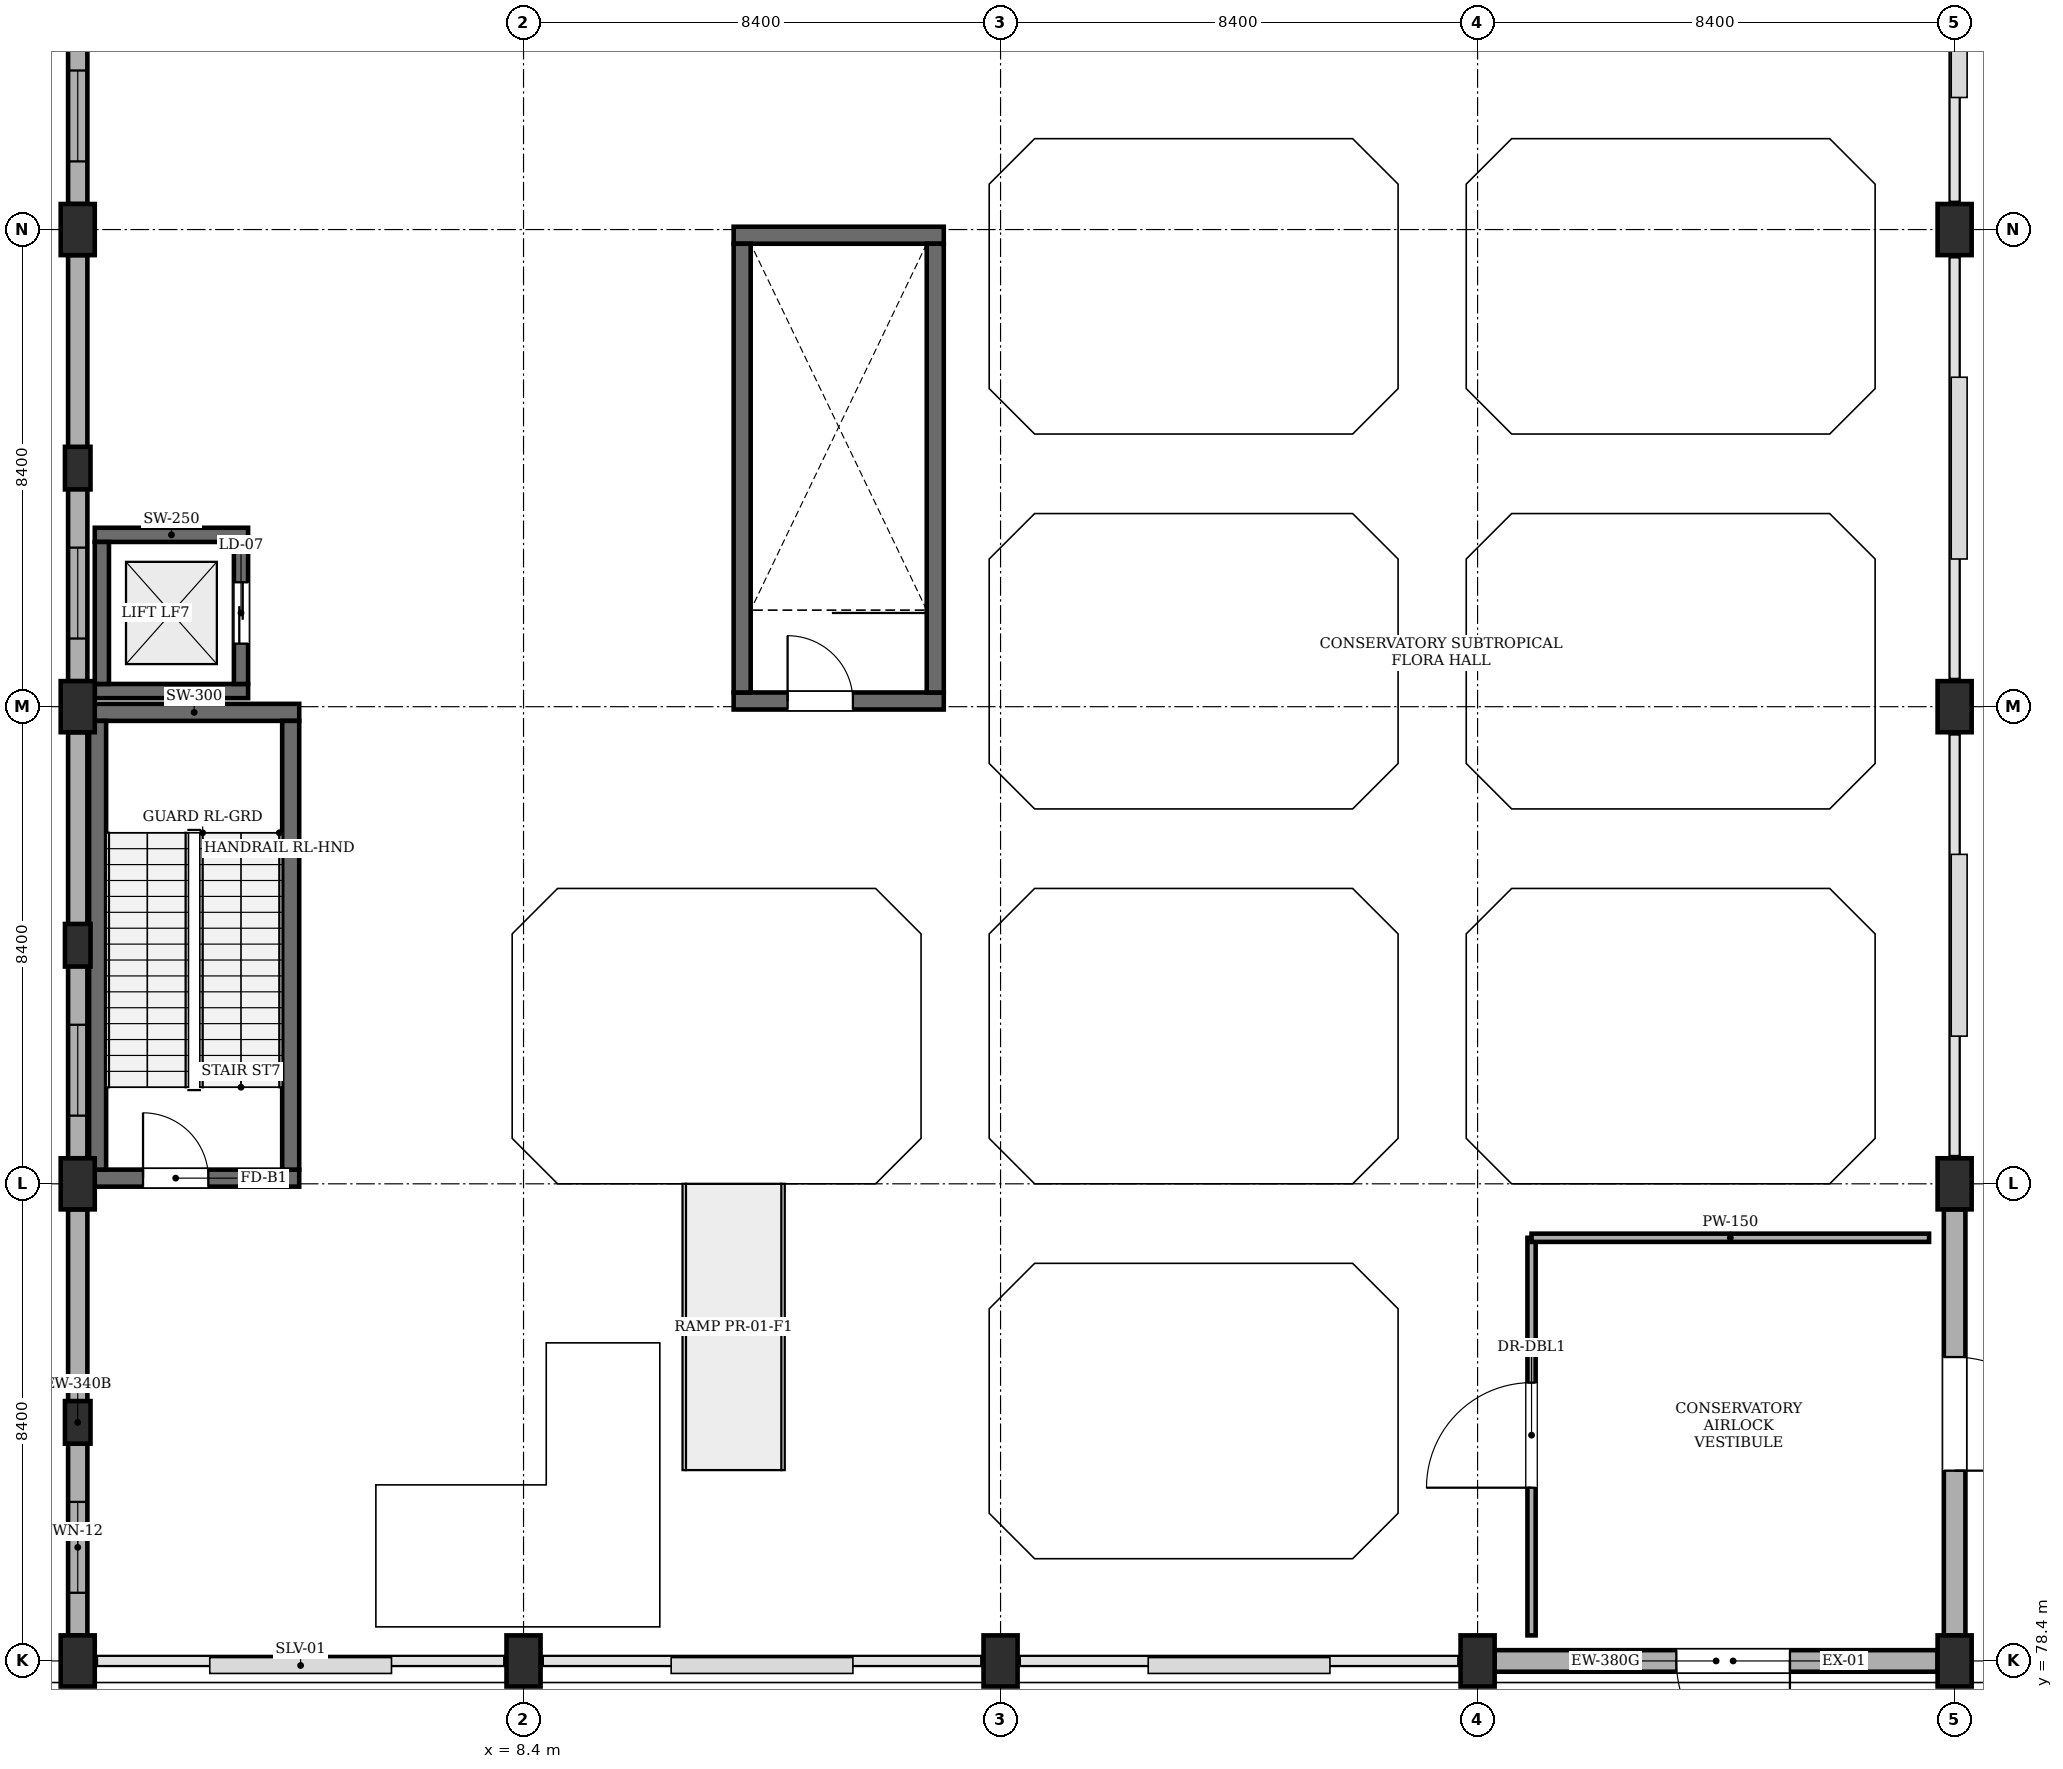
"""IFC4 building model, lengths in metres.
Left out: names, types, materials, properties, quantities, classifications, styles, units other than length and angle.
Written with IfcOpenShell. Run it as: python <this file> out.ifc"""

import sys

from ifc_helpers import new_model, si_unit, direction, frame, frame_2d, origin, origin_2d, place, context, subcontext, project, spatial, rectangle, extrude, element, fill, save


model = new_model("IFC4")
c1 = context("Model", 3, precision=1e-05, world=origin(), true_north=direction((0.0, 1.0)))
c2 = subcontext(c1, "Body", "Model", "MODEL_VIEW")
j1 = project(units=[si_unit("LENGTHUNIT", "METRE"), si_unit("PLANEANGLEUNIT", "RADIAN")], contexts=[c1])
p1 = place(None, origin())
s1 = spatial("IfcSite", under=j1, at=p1, CompositionType="ELEMENT")
p2 = place(p1, origin())
s2 = spatial("IfcBuilding", under=s1, at=p2, CompositionType="ELEMENT")
p3 = place(p2, origin())
s3 = spatial("IfcBuildingStorey", under=s2, at=p3, CompositionType="ELEMENT", Elevation=0.0)
for number, where, z_axis, x_axis in (
    (1, (0.55, 78.4, 0.0), (0.0, 0.0, 1.0), (1.0, 0.0, 0.0)),
    (2, (0.55, 86.8, 0.0), (0.0, 0.0, 1.0), (1.0, 0.0, 0.0)),
    (3, (0.55, 95.2, 0.0), (0.0, 0.0, 1.0), (1.0, 0.0, 0.0)),
    (4, (0.55, 103.6, 0.0), (0.0, 0.0, 1.0), (1.0, 0.0, 0.0)),
):
    element("IfcColumn", number, at=place(p3, frame(where, z_axis=z_axis, x_axis=x_axis)), inside=s3, PredefinedType="COLUMN", context=c2, shape_type="SweptSolid", body=[
        extrude(rectangle(XDim=0.6, YDim=0.9, at=origin_2d()), origin(), (0.0, 0.0, 1.0), 5.18),
    ])
for number, where, z_axis, x_axis in (
    (5, (8.4, 78.4, 0.0), (0.0, 0.0, 1.0), (1.0, 0.0, 0.0)),
    (6, (16.8, 78.4, 0.0), (0.0, 0.0, 1.0), (1.0, 0.0, 0.0)),
    (7, (25.2, 78.4, 0.0), (0.0, 0.0, 1.0), (1.0, 0.0, 0.0)),
    (8, (33.6, 78.4, 0.0), (0.0, 0.0, 1.0), (1.0, 0.0, 0.0)),
    (9, (33.6, 86.8, 0.0), (0.0, 0.0, 1.0), (1.0, 0.0, 0.0)),
    (10, (33.6, 95.2, 0.0), (0.0, 0.0, 1.0), (1.0, 0.0, 0.0)),
    (11, (33.6, 103.6, 0.0), (0.0, 0.0, 1.0), (1.0, 0.0, 0.0)),
):
    element("IfcColumn", number, at=place(p3, frame(where, z_axis=z_axis, x_axis=x_axis)), inside=s3, PredefinedType="COLUMN", context=c2, shape_type="SweptSolid", body=[
        extrude(rectangle(XDim=0.6, YDim=0.9, at=origin_2d()), origin(), (0.0, 0.0, 1.0), 5.4),
    ])
for number, where, z_axis, x_axis in (
    (12, (0.55, 82.6, 0.0), (0.0, 0.0, 1.0), (1.0, 0.0, 0.0)),
    (13, (0.55, 91.0, 0.0), (0.0, 0.0, 1.0), (1.0, 0.0, 0.0)),
    (14, (0.55, 99.4, 0.0), (0.0, 0.0, 1.0), (1.0, 0.0, 0.0)),
):
    element("IfcColumn", number, at=place(p3, frame(where, z_axis=z_axis, x_axis=x_axis)), inside=s3, PredefinedType="PILASTER", context=c2, shape_type="SweptSolid", body=[
        extrude(rectangle(XDim=0.45, YDim=0.75, at=origin_2d()), origin(), (0.0, 0.0, 1.0), 5.18),
    ])
p4 = place(p3, frame((0.75, 86.9, 0.0), z_axis=(0.0, 0.0, 1.0), x_axis=(1.0, 0.0, 0.0)))
e15 = element("IfcWall", 15, at=p4, inside=s3, PredefinedType="SHEAR", context=c2, shape_type="SweptSolid", body=[
    extrude(rectangle(XDim=3.7, YDim=0.3, at=frame_2d((1.85, 0.0))), origin(), (0.0, 0.0, 1.0), 5.18),
])
p5 = place(p4, frame((0.95, 0.0, 0.0)))
e16 = element("IfcOpeningElement", 16, at=p5, cuts=e15, PredefinedType="OPENING", context=c2, shape_type="SweptSolid", body=[
    extrude(rectangle(XDim=1.15, YDim=2.15, at=frame_2d((0.575, 1.075))), frame((0.0, 0.16, 0.0), z_axis=(0.0, -1.0, 0.0), x_axis=(1.0, 0.0, 0.0)), (0.0, 0.0, 1.0), 0.32),
])
p6 = place(p3, frame((0.75, 95.1, 0.0), z_axis=(0.0, 0.0, 1.0), x_axis=(1.0, 0.0, 0.0)))
e17 = element("IfcWall", 17, at=p6, inside=s3, PredefinedType="SHEAR", context=c2, shape_type="SweptSolid", body=[
    extrude(rectangle(XDim=3.7, YDim=0.3, at=frame_2d((1.85, 0.0))), origin(), (0.0, 0.0, 1.0), 5.18),
])
for number, where, z_axis, x_axis in (
    (18, (0.9, 87.05, 0.0), (0.0, 0.0, 1.0), (0.0, 1.0, 0.0)),
    (19, (4.3, 87.05, 0.0), (0.0, 0.0, 1.0), (0.0, 1.0, 0.0)),
):
    element("IfcWall", number, at=place(p3, frame(where, z_axis=z_axis, x_axis=x_axis)), inside=s3, PredefinedType="SHEAR", context=c2, shape_type="SweptSolid", body=[
        extrude(rectangle(XDim=7.9, YDim=0.3, at=frame_2d((3.95, 0.0))), origin(), (0.0, 0.0, 1.0), 5.18),
    ])
p7 = place(p3, frame((12.1, 95.3, 0.0), z_axis=(0.0, 0.0, 1.0), x_axis=(1.0, 0.0, 0.0)))
e20 = element("IfcWall", 20, at=p7, inside=s3, PredefinedType="SHEAR", context=c2, shape_type="SweptSolid", body=[
    extrude(rectangle(XDim=3.7, YDim=0.3, at=frame_2d((1.85, 0.0))), origin(), (0.0, 0.0, 1.0), 5.18),
])
p8 = place(p7, frame((0.95, 0.0, 0.0)))
e21 = element("IfcOpeningElement", 21, at=p8, cuts=e20, PredefinedType="OPENING", context=c2, shape_type="SweptSolid", body=[
    extrude(rectangle(XDim=1.15, YDim=2.15, at=frame_2d((0.575, 1.075))), frame((0.0, 0.16, 0.0), z_axis=(0.0, -1.0, 0.0), x_axis=(1.0, 0.0, 0.0)), (0.0, 0.0, 1.0), 0.32),
])
p9 = place(p3, frame((12.1, 103.5, 0.0), z_axis=(0.0, 0.0, 1.0), x_axis=(1.0, 0.0, 0.0)))
e22 = element("IfcWall", 22, at=p9, inside=s3, PredefinedType="SHEAR", context=c2, shape_type="SweptSolid", body=[
    extrude(rectangle(XDim=3.7, YDim=0.3, at=frame_2d((1.85, 0.0))), origin(), (0.0, 0.0, 1.0), 5.18),
])
for number, where, z_axis, x_axis in (
    (23, (12.25, 95.45, 0.0), (0.0, 0.0, 1.0), (0.0, 1.0, 0.0)),
    (24, (15.65, 95.45, 0.0), (0.0, 0.0, 1.0), (0.0, 1.0, 0.0)),
):
    element("IfcWall", number, at=place(p3, frame(where, z_axis=z_axis, x_axis=x_axis)), inside=s3, PredefinedType="SHEAR", context=c2, shape_type="SweptSolid", body=[
        extrude(rectangle(XDim=7.9, YDim=0.3, at=frame_2d((3.95, 0.0))), origin(), (0.0, 0.0, 1.0), 5.18),
    ])
for number, where, z_axis, x_axis in (
    (25, (0.85, 95.475, 0.0), (0.0, 0.0, 1.0), (1.0, 0.0, 0.0)),
    (26, (0.85, 98.225, 0.0), (0.0, 0.0, 1.0), (1.0, 0.0, 0.0)),
):
    element("IfcWall", number, at=place(p3, frame(where, z_axis=z_axis, x_axis=x_axis)), inside=s3, PredefinedType="SHEAR", context=c2, shape_type="SweptSolid", body=[
        extrude(rectangle(XDim=2.7, YDim=0.25, at=frame_2d((1.35, 0.0))), origin(), (0.0, 0.0, 1.0), 5.18),
    ])
p10 = place(p3, frame((0.975, 95.6, 0.0), z_axis=(0.0, 0.0, 1.0), x_axis=(0.0, 1.0, 0.0)))
e27 = element("IfcWall", 27, at=p10, inside=s3, PredefinedType="SHEAR", context=c2, shape_type="SweptSolid", body=[
    extrude(rectangle(XDim=2.5, YDim=0.25, at=frame_2d((1.25, 0.0))), origin(), (0.0, 0.0, 1.0), 5.18),
])
p11 = place(p3, frame((3.425, 95.6, 0.0), z_axis=(0.0, 0.0, 1.0), x_axis=(0.0, 1.0, 0.0)))
e28 = element("IfcWall", 28, at=p11, inside=s3, PredefinedType="SHEAR", context=c2, shape_type="SweptSolid", body=[
    extrude(rectangle(XDim=2.5, YDim=0.25, at=frame_2d((1.25, 0.0))), origin(), (0.0, 0.0, 1.0), 5.18),
])
p12 = place(p11, frame((0.71, 0.0, 0.0)))
e29 = element("IfcOpeningElement", 29, at=p12, cuts=e28, PredefinedType="OPENING", context=c2, shape_type="SweptSolid", body=[
    extrude(rectangle(XDim=1.08, YDim=2.18, at=frame_2d((0.54, 1.09))), frame((0.0, 0.135, 0.0), z_axis=(0.0, -1.0, 0.0), x_axis=(1.0, 0.0, 0.0)), (0.0, 0.0, 1.0), 0.27),
])
p13 = place(p3, frame((33.3, 78.4, 0.0), z_axis=(0.0, 0.0, 1.0), x_axis=(-1.0, 0.0, 0.0)))
e30 = element("IfcWall", 30, at=p13, inside=s3, PredefinedType="SOLIDWALL", context=c2, shape_type="SweptSolid", body=[
    extrude(rectangle(XDim=7.8, YDim=0.38, at=frame_2d((3.9, 0.0))), origin(), (0.0, 0.0, 1.0), 5.24),
])
p14 = place(p13, frame((2.6, 0.0, 0.0)))
e31 = element("IfcOpeningElement", 31, at=p14, cuts=e30, PredefinedType="OPENING", context=c2, shape_type="SweptSolid", body=[
    extrude(rectangle(XDim=2.0, YDim=2.4, at=frame_2d((1.0, 1.2))), frame((0.0, 0.2, 0.0), z_axis=(0.0, -1.0, 0.0), x_axis=(1.0, 0.0, 0.0)), (0.0, 0.0, 1.0), 0.4),
])
p15 = place(p3, frame((0.55, 78.85, 0.0), z_axis=(0.0, 0.0, 1.0), x_axis=(0.0, 1.0, 0.0)))
e32 = element("IfcWall", 32, at=p15, inside=s3, PredefinedType="STANDARD", context=c2, shape_type="SweptSolid", body=[
    extrude(rectangle(XDim=7.5, YDim=0.34, at=frame_2d((3.75, 0.0))), origin(), (0.0, 0.0, 1.0), 4.43),
])
p16 = place(p15, frame((0.75, 0.0, 1.0)))
e33 = element("IfcOpeningElement", 33, at=p16, cuts=e32, PredefinedType="OPENING", context=c2, shape_type="SweptSolid", body=[
    extrude(rectangle(XDim=1.6, YDim=2.0, at=frame_2d((0.8, 1.0))), frame((0.0, 0.18, 0.0), z_axis=(0.0, -1.0, 0.0), x_axis=(1.0, 0.0, 0.0)), (0.0, 0.0, 1.0), 0.36),
])
p17 = place(p3, frame((33.6, 86.35, 0.0), z_axis=(0.0, 0.0, 1.0), x_axis=(0.0, -1.0, 0.0)))
e34 = element("IfcWall", 34, at=p17, inside=s3, PredefinedType="SOLIDWALL", context=c2, shape_type="SweptSolid", body=[
    extrude(rectangle(XDim=7.5, YDim=0.38, at=frame_2d((3.75, 0.0))), origin(), (0.0, 0.0, 1.0), 5.24),
])
p18 = place(p17, frame((2.6, 0.0, 0.0)))
e35 = element("IfcOpeningElement", 35, at=p18, cuts=e34, PredefinedType="OPENING", context=c2, shape_type="SweptSolid", body=[
    extrude(rectangle(XDim=2.0, YDim=2.4, at=frame_2d((1.0, 1.2))), frame((0.0, 0.2, 0.0), z_axis=(0.0, -1.0, 0.0), x_axis=(1.0, 0.0, 0.0)), (0.0, 0.0, 1.0), 0.4),
])
p19 = place(p3, frame((0.55, 87.25, 0.0), z_axis=(0.0, 0.0, 1.0), x_axis=(0.0, 1.0, 0.0)))
e36 = element("IfcWall", 36, at=p19, inside=s3, PredefinedType="STANDARD", context=c2, shape_type="SweptSolid", body=[
    extrude(rectangle(XDim=7.5, YDim=0.34, at=frame_2d((3.75, 0.0))), origin(), (0.0, 0.0, 1.0), 4.43),
])
p20 = place(p19, frame((0.75, 0.0, 1.0)))
e37 = element("IfcOpeningElement", 37, at=p20, cuts=e36, PredefinedType="OPENING", context=c2, shape_type="SweptSolid", body=[
    extrude(rectangle(XDim=1.6, YDim=2.0, at=frame_2d((0.8, 1.0))), frame((0.0, 0.18, 0.0), z_axis=(0.0, -1.0, 0.0), x_axis=(1.0, 0.0, 0.0)), (0.0, 0.0, 1.0), 0.36),
])
p21 = place(p3, frame((0.55, 95.65, 0.0), z_axis=(0.0, 0.0, 1.0), x_axis=(0.0, 1.0, 0.0)))
e38 = element("IfcWall", 38, at=p21, inside=s3, PredefinedType="STANDARD", context=c2, shape_type="SweptSolid", body=[
    extrude(rectangle(XDim=7.5, YDim=0.34, at=frame_2d((3.75, 0.0))), origin(), (0.0, 0.0, 1.0), 4.43),
])
p22 = place(p21, frame((0.75, 0.0, 1.0)))
e39 = element("IfcOpeningElement", 39, at=p22, cuts=e38, PredefinedType="OPENING", context=c2, shape_type="SweptSolid", body=[
    extrude(rectangle(XDim=1.6, YDim=2.0, at=frame_2d((0.8, 1.0))), frame((0.0, 0.18, 0.0), z_axis=(0.0, -1.0, 0.0), x_axis=(1.0, 0.0, 0.0)), (0.0, 0.0, 1.0), 0.36),
])
p23 = place(p3, frame((0.55, 104.05, 0.0), z_axis=(0.0, 0.0, 1.0), x_axis=(0.0, 1.0, 0.0)))
e40 = element("IfcWall", 40, at=p23, inside=s3, PredefinedType="STANDARD", context=c2, shape_type="SweptSolid", body=[
    extrude(rectangle(XDim=6.95, YDim=0.34, at=frame_2d((3.475, 0.0))), origin(), (0.0, 0.0, 1.0), 4.43),
])
p24 = place(p23, frame((0.75, 0.0, 1.0)))
e41 = element("IfcOpeningElement", 41, at=p24, cuts=e40, PredefinedType="OPENING", context=c2, shape_type="SweptSolid", body=[
    extrude(rectangle(XDim=1.6, YDim=2.0, at=frame_2d((0.8, 1.0))), frame((0.0, 0.18, 0.0), z_axis=(0.0, -1.0, 0.0), x_axis=(1.0, 0.0, 0.0)), (0.0, 0.0, 1.0), 0.36),
])
p25 = place(p3, frame((26.15, 78.85, 0.0), z_axis=(0.0, 0.0, 1.0), x_axis=(0.0, 1.0, 0.0)))
e42 = element("IfcWall", 42, at=p25, inside=s3, PredefinedType="PARTITIONING", context=c2, shape_type="SweptSolid", body=[
    extrude(rectangle(XDim=7.0, YDim=0.145, at=frame_2d((3.5, 0.0))), origin(), (0.0, 0.0, 1.0), 5.18),
])
p26 = place(p25, frame((2.6, 0.0, 0.0)))
e43 = element("IfcOpeningElement", 43, at=p26, cuts=e42, PredefinedType="OPENING", context=c2, shape_type="SweptSolid", body=[
    extrude(rectangle(XDim=1.85, YDim=2.25, at=frame_2d((0.925, 1.125))), frame((0.0, 0.083, 0.0), z_axis=(0.0, -1.0, 0.0), x_axis=(1.0, 0.0, 0.0)), (0.0, 0.0, 1.0), 0.165),
])
p27 = place(p3, frame((26.15, 85.85, 0.0), z_axis=(0.0, 0.0, 1.0), x_axis=(1.0, 0.0, 0.0)))
e44 = element("IfcWall", 44, at=p27, inside=s3, PredefinedType="PARTITIONING", context=c2, shape_type="SweptSolid", body=[
    extrude(rectangle(XDim=7.0, YDim=0.145, at=frame_2d((3.5, 0.0))), origin(), (0.0, 0.0, 1.0), 5.18),
])
p28 = place(p14, origin())
e45 = element("IfcDoor", 45, at=p28, inside=s3, OperationType="SINGLE_SWING_LEFT", PredefinedType="DOOR", context=c2, shape_type="SweptSolid", body=[
    extrude(rectangle(XDim=2.0, YDim=2.4, at=frame_2d((1.0, 1.2))), frame((0.0, 0.025, 0.0), z_axis=(0.0, -1.0, 0.0), x_axis=(1.0, 0.0, 0.0)), (0.0, 0.0, 1.0), 0.05),
])
fill(e31, e45)
p29 = place(p16, origin())
e46 = element("IfcWindow", 46, at=p29, inside=s3, PartitioningType="DOUBLE_PANEL_VERTICAL", PredefinedType="WINDOW", context=c2, shape_type="SweptSolid", body=[
    extrude(rectangle(XDim=1.6, YDim=2.0, at=frame_2d((0.8, 1.0))), frame((0.0, 0.03, 0.0), z_axis=(0.0, -1.0, 0.0), x_axis=(1.0, 0.0, 0.0)), (0.0, 0.0, 1.0), 0.06),
])
fill(e33, e46)
p30 = place(p18, origin())
e47 = element("IfcDoor", 47, at=p30, inside=s3, OperationType="SINGLE_SWING_RIGHT", PredefinedType="DOOR", context=c2, shape_type="SweptSolid", body=[
    extrude(rectangle(XDim=2.0, YDim=2.4, at=frame_2d((1.0, 1.2))), frame((0.0, 0.025, 0.0), z_axis=(0.0, -1.0, 0.0), x_axis=(1.0, 0.0, 0.0)), (0.0, 0.0, 1.0), 0.05),
])
fill(e35, e47)
p31 = place(p20, origin())
e48 = element("IfcWindow", 48, at=p31, inside=s3, PartitioningType="DOUBLE_PANEL_VERTICAL", PredefinedType="WINDOW", context=c2, shape_type="SweptSolid", body=[
    extrude(rectangle(XDim=1.6, YDim=2.0, at=frame_2d((0.8, 1.0))), frame((0.0, 0.03, 0.0), z_axis=(0.0, -1.0, 0.0), x_axis=(1.0, 0.0, 0.0)), (0.0, 0.0, 1.0), 0.06),
])
fill(e37, e48)
p32 = place(p22, origin())
e49 = element("IfcWindow", 49, at=p32, inside=s3, PartitioningType="DOUBLE_PANEL_VERTICAL", PredefinedType="WINDOW", context=c2, shape_type="SweptSolid", body=[
    extrude(rectangle(XDim=1.6, YDim=2.0, at=frame_2d((0.8, 1.0))), frame((0.0, 0.03, 0.0), z_axis=(0.0, -1.0, 0.0), x_axis=(1.0, 0.0, 0.0)), (0.0, 0.0, 1.0), 0.06),
])
fill(e39, e49)
p33 = place(p24, origin())
e50 = element("IfcWindow", 50, at=p33, inside=s3, PartitioningType="DOUBLE_PANEL_VERTICAL", PredefinedType="WINDOW", context=c2, shape_type="SweptSolid", body=[
    extrude(rectangle(XDim=1.6, YDim=2.0, at=frame_2d((0.8, 1.0))), frame((0.0, 0.03, 0.0), z_axis=(0.0, -1.0, 0.0), x_axis=(1.0, 0.0, 0.0)), (0.0, 0.0, 1.0), 0.06),
])
fill(e41, e50)
p34 = place(p26, origin())
e51 = element("IfcDoor", 51, at=p34, inside=s3, OperationType="SINGLE_SWING_LEFT", PredefinedType="DOOR", context=c2, shape_type="SweptSolid", body=[
    extrude(rectangle(XDim=1.85, YDim=2.25, at=frame_2d((0.925, 1.125))), frame((0.0, 0.025, 0.0), z_axis=(0.0, -1.0, 0.0), x_axis=(1.0, 0.0, 0.0)), (0.0, 0.0, 1.0), 0.05),
])
fill(e43, e51)
p35 = place(p5, origin())
e52 = element("IfcDoor", 52, at=p35, inside=s3, OperationType="SINGLE_SWING_LEFT", PredefinedType="DOOR", context=c2, shape_type="SweptSolid", body=[
    extrude(rectangle(XDim=1.15, YDim=2.15, at=frame_2d((0.575, 1.075))), frame((0.0, 0.025, 0.0), z_axis=(0.0, -1.0, 0.0), x_axis=(1.0, 0.0, 0.0)), (0.0, 0.0, 1.0), 0.05),
])
fill(e16, e52)
p36 = place(p8, origin())
e53 = element("IfcDoor", 53, at=p36, inside=s3, OperationType="SINGLE_SWING_LEFT", PredefinedType="DOOR", context=c2, shape_type="SweptSolid", body=[
    extrude(rectangle(XDim=1.15, YDim=2.15, at=frame_2d((0.575, 1.075))), frame((0.0, 0.025, 0.0), z_axis=(0.0, -1.0, 0.0), x_axis=(1.0, 0.0, 0.0)), (0.0, 0.0, 1.0), 0.05),
])
fill(e21, e53)
p37 = place(p12, origin())
e54 = element("IfcDoor", 54, at=p37, inside=s3, OperationType="SLIDING_TO_LEFT", PredefinedType="DOOR", context=c2, shape_type="SweptSolid", body=[
    extrude(rectangle(XDim=1.08, YDim=2.18, at=frame_2d((0.54, 1.09))), frame((0.0, 0.025, 0.0), z_axis=(0.0, -1.0, 0.0), x_axis=(1.0, 0.0, 0.0)), (0.0, 0.0, 1.0), 0.05),
])
fill(e29, e54)
save(model, sys.argv[1])
